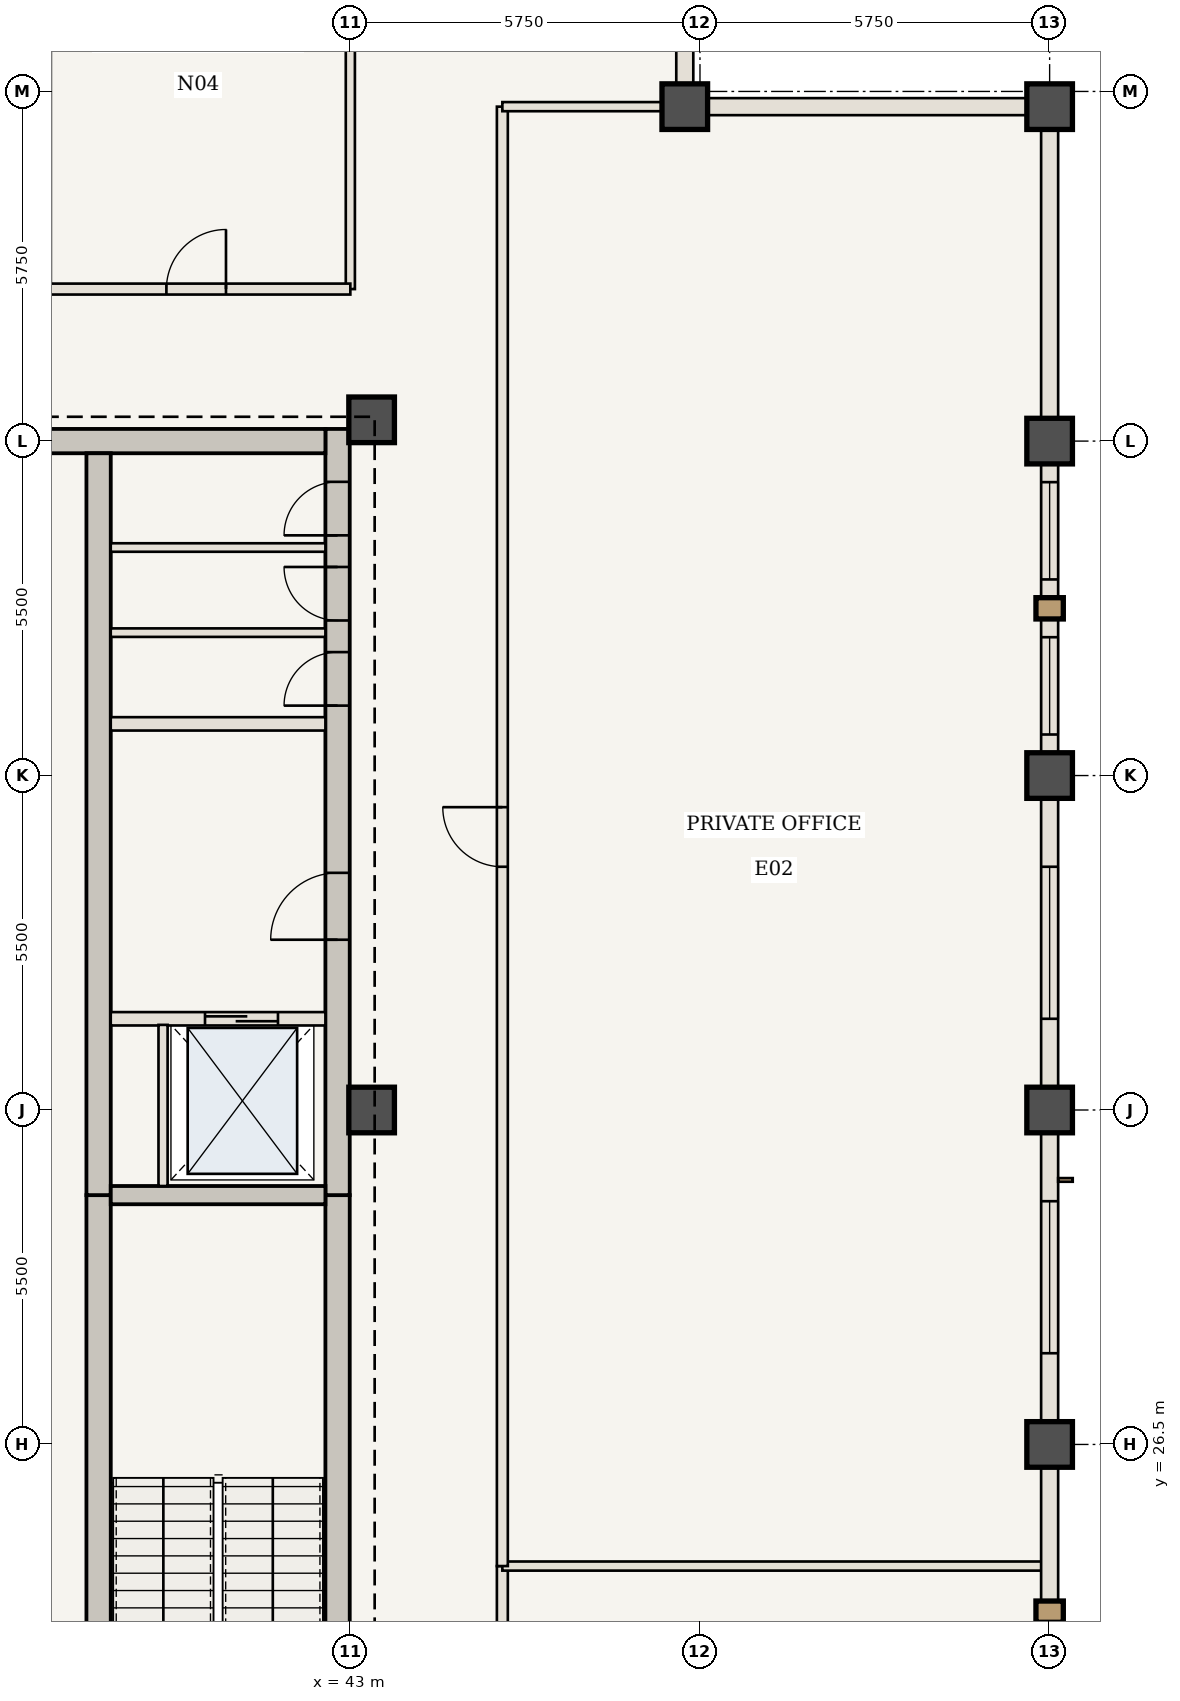
"""IFC4 building model, lengths in metres.
Left out: names, types, materials, properties, quantities, classifications, styles, units other than length and angle.
Written with IfcOpenShell. Run it as: python <this file> out.ifc"""

import sys

from ifc_helpers import new_model, si_unit, direction, frame, frame_2d, origin, origin_2d, place, context, subcontext, project, spatial, rectangle, extrude, element, fill, save


model = new_model("IFC4")
c1 = context("Model", 3, precision=1e-05, world=origin(), true_north=direction((0.0, 1.0)))
c2 = subcontext(c1, "Body", "Model", "MODEL_VIEW")
j1 = project(units=[si_unit("LENGTHUNIT", "METRE"), si_unit("PLANEANGLEUNIT", "RADIAN")], contexts=[c1])
p1 = place(None, origin())
s1 = spatial("IfcSite", under=j1, at=p1, CompositionType="ELEMENT")
p2 = place(p1, origin())
s2 = spatial("IfcBuilding", under=s1, at=p2, CompositionType="ELEMENT")
p3 = place(p2, frame((0.0, 0.0, 277.55)))
s3 = spatial("IfcBuildingStorey", under=s2, at=p3, CompositionType="ELEMENT", Elevation=277.55)
p4 = place(p3, frame((42.79, 20.75, 0.0), z_axis=(0.0, 0.0, 1.0), x_axis=(0.0, 1.0, 0.0)))
e1 = element("IfcWall", 1, at=p4, inside=s3, PredefinedType="SHEAR", context=c2, shape_type="SweptSolid", body=[
    extrude(rectangle(XDim=9.85, YDim=0.4, at=frame_2d((4.925, 0.0))), origin(), (0.0, 0.0, 1.0), 3.85),
])
p5 = place(p4, frame((1.0, 0.0, 0.0)))
e2 = element("IfcOpeningElement", 2, at=p5, cuts=e1, PredefinedType="OPENING", context=c2, shape_type="SweptSolid", body=[
    extrude(rectangle(XDim=1.15, YDim=2.15, at=frame_2d((0.575, 1.075))), frame((0.0, 0.21, 0.0), z_axis=(0.0, -1.0, 0.0), x_axis=(1.0, 0.0, 0.0)), (0.0, 0.0, 1.0), 0.42),
])
p6 = place(p3, frame((42.79, 30.6, 0.0), z_axis=(0.0, 0.0, 1.0), x_axis=(0.0, 1.0, 0.0)))
e3 = element("IfcWall", 3, at=p6, inside=s3, PredefinedType="SHEAR", context=c2, shape_type="SweptSolid", body=[
    extrude(rectangle(XDim=12.6, YDim=0.4, at=frame_2d((6.3, 0.0))), origin(), (0.0, 0.0, 1.0), 3.85),
])
p7 = place(p6, frame((4.2, 0.0, 0.0)))
e4 = element("IfcOpeningElement", 4, at=p7, cuts=e3, PredefinedType="OPENING", context=c2, shape_type="SweptSolid", body=[
    extrude(rectangle(XDim=1.1, YDim=2.15, at=frame_2d((0.55, 1.075))), frame((0.0, 0.21, 0.0), z_axis=(0.0, -1.0, 0.0), x_axis=(1.0, 0.0, 0.0)), (0.0, 0.0, 1.0), 0.42),
])
p8 = place(p6, frame((8.05, 0.0, 0.0)))
e5 = element("IfcOpeningElement", 5, at=p8, cuts=e3, PredefinedType="OPENING", context=c2, shape_type="SweptSolid", body=[
    extrude(rectangle(XDim=0.88, YDim=2.1, at=frame_2d((0.44, 1.05))), frame((0.0, 0.21, 0.0), z_axis=(0.0, -1.0, 0.0), x_axis=(1.0, 0.0, 0.0)), (0.0, 0.0, 1.0), 0.42),
])
p9 = place(p6, frame((9.45, 0.0, 0.0)))
e6 = element("IfcOpeningElement", 6, at=p9, cuts=e3, PredefinedType="OPENING", context=c2, shape_type="SweptSolid", body=[
    extrude(rectangle(XDim=0.88, YDim=2.1, at=frame_2d((0.44, 1.05))), frame((0.0, 0.21, 0.0), z_axis=(0.0, -1.0, 0.0), x_axis=(1.0, 0.0, 0.0)), (0.0, 0.0, 1.0), 0.42),
])
p10 = place(p6, frame((10.85, 0.0, 0.0)))
e7 = element("IfcOpeningElement", 7, at=p10, cuts=e3, PredefinedType="OPENING", context=c2, shape_type="SweptSolid", body=[
    extrude(rectangle(XDim=0.88, YDim=2.1, at=frame_2d((0.44, 1.05))), frame((0.0, 0.21, 0.0), z_axis=(0.0, -1.0, 0.0), x_axis=(1.0, 0.0, 0.0)), (0.0, 0.0, 1.0), 0.42),
])
p11 = place(p3, frame((37.75, 43.0, 0.0), z_axis=(0.0, 0.0, 1.0), x_axis=(1.0, 0.0, 0.0)))
e8 = element("IfcWall", 8, at=p11, inside=s3, PredefinedType="SHEAR", context=c2, shape_type="SweptSolid", body=[
    extrude(rectangle(XDim=4.84, YDim=0.4, at=frame_2d((2.42, 0.0))), origin(), (0.0, 0.0, 1.0), 3.85),
])
p12 = place(p3, frame((38.86, 21.15, 0.0), z_axis=(0.0, 0.0, 1.0), x_axis=(0.0, 1.0, 0.0)))
e9 = element("IfcWall", 9, at=p12, inside=s3, PredefinedType="SHEAR", context=c2, shape_type="SweptSolid", body=[
    extrude(rectangle(XDim=9.45, YDim=0.4, at=frame_2d((4.725, 0.0))), origin(), (0.0, 0.0, 1.0), 3.85),
])
p13 = place(p3, frame((38.86, 30.6, 0.0), z_axis=(0.0, 0.0, 1.0), x_axis=(0.0, 1.0, 0.0)))
e10 = element("IfcWall", 10, at=p13, inside=s3, PredefinedType="SHEAR", context=c2, shape_type="SweptSolid", body=[
    extrude(rectangle(XDim=12.2, YDim=0.4, at=frame_2d((6.1, 0.0))), origin(), (0.0, 0.0, 1.0), 3.85),
])
for number, where, z_axis, x_axis in (
    (11, (43.35, 32.0, 0.0), (0.0, 0.0, 1.0), (1.0, 0.0, 0.0)),
    (12, (43.35, 43.35, 0.0), (0.0, 0.0, 1.0), (1.0, 0.0, 0.0)),
    (13, (54.5, 48.5, 0.0), (0.0, 0.0, 1.0), (1.0, 0.0, 0.0)),
    (14, (48.5, 48.5, 0.0), (0.0, 0.0, 1.0), (1.0, 0.0, 0.0)),
    (15, (54.5, 26.5, 0.0), (0.0, 0.0, 1.0), (1.0, 0.0, 0.0)),
    (16, (54.5, 32.0, 0.0), (0.0, 0.0, 1.0), (1.0, 0.0, 0.0)),
    (17, (54.5, 37.5, 0.0), (0.0, 0.0, 1.0), (1.0, 0.0, 0.0)),
    (18, (54.5, 43.0, 0.0), (0.0, 0.0, 1.0), (1.0, 0.0, 0.0)),
):
    element("IfcColumn", number, at=place(p3, frame(where, z_axis=z_axis, x_axis=x_axis)), inside=s3, PredefinedType="COLUMN", context=c2, shape_type="SweptSolid", body=[
        extrude(rectangle(XDim=0.75, YDim=0.75, at=origin_2d()), origin(), (0.0, 0.0, 1.0), 3.85),
    ])
p14 = place(p3, frame((39.06, 30.6, 0.0), z_axis=(0.0, 0.0, 1.0), x_axis=(1.0, 0.0, 0.0)))
e19 = element("IfcWall", 19, at=p14, inside=s3, PredefinedType="SHEAR", context=c2, shape_type="SweptSolid", body=[
    extrude(rectangle(XDim=3.53, YDim=0.3, at=frame_2d((1.765, 0.0))), origin(), (0.0, 0.0, 1.0), 3.685),
])
p15 = place(p3, frame((39.06, 33.5, 0.0), z_axis=(0.0, 0.0, 1.0), x_axis=(1.0, 0.0, 0.0)))
e20 = element("IfcWall", 20, at=p15, inside=s3, PredefinedType="STANDARD", context=c2, shape_type="SweptSolid", body=[
    extrude(rectangle(XDim=3.53, YDim=0.22, at=frame_2d((1.765, 0.0))), origin(), (0.0, 0.0, 1.0), 3.685),
])
p16 = place(p15, frame((1.55, 0.0, 0.0)))
e21 = element("IfcOpeningElement", 21, at=p16, cuts=e20, PredefinedType="OPENING", context=c2, shape_type="SweptSolid", body=[
    extrude(rectangle(XDim=1.2, YDim=2.2, at=frame_2d((0.6, 1.1))), frame((0.0, 0.12, 0.0), z_axis=(0.0, -1.0, 0.0), x_axis=(1.0, 0.0, 0.0)), (0.0, 0.0, 1.0), 0.24),
])
p17 = place(p3, frame((39.92, 30.75, 0.0), z_axis=(0.0, 0.0, 1.0), x_axis=(0.0, 1.0, 0.0)))
e22 = element("IfcWall", 22, at=p17, inside=s3, PredefinedType="STANDARD", context=c2, shape_type="SweptSolid", body=[
    extrude(rectangle(XDim=2.65, YDim=0.15, at=frame_2d((1.325, 0.0))), origin(), (0.0, 0.0, 1.0), 3.685),
])
p18 = place(p3, frame((39.06, 38.35, 0.0), z_axis=(0.0, 0.0, 1.0), x_axis=(1.0, 0.0, 0.0)))
e23 = element("IfcWall", 23, at=p18, inside=s3, PredefinedType="STANDARD", context=c2, shape_type="SweptSolid", body=[
    extrude(rectangle(XDim=3.53, YDim=0.22, at=frame_2d((1.765, 0.0))), origin(), (0.0, 0.0, 1.0), 3.685),
])
for number, where, z_axis, x_axis in (
    (24, (39.06, 39.85, 0.0), (0.0, 0.0, 1.0), (1.0, 0.0, 0.0)),
    (25, (39.06, 41.25, 0.0), (0.0, 0.0, 1.0), (1.0, 0.0, 0.0)),
):
    element("IfcWall", number, at=place(p3, frame(where, z_axis=z_axis, x_axis=x_axis)), inside=s3, PredefinedType="STANDARD", context=c2, shape_type="SweptSolid", body=[
        extrude(rectangle(XDim=3.53, YDim=0.14, at=frame_2d((1.765, 0.0))), origin(), (0.0, 0.0, 1.0), 3.685),
    ])
p19 = place(p3, frame((43.0, 45.5, 0.0), z_axis=(0.0, 0.0, 1.0), x_axis=(0.0, 1.0, 0.0)))
e26 = element("IfcWall", 26, at=p19, inside=s3, PredefinedType="STANDARD", context=c2, shape_type="SweptSolid", body=[
    extrude(rectangle(XDim=8.94, YDim=0.15, at=frame_2d((4.47, 0.0))), origin(), (0.0, 0.0, 1.0), 3.685),
])
p20 = place(p3, frame((38.0, 45.5, 0.0), z_axis=(0.0, 0.0, 1.0), x_axis=(1.0, 0.0, 0.0)))
e27 = element("IfcWall", 27, at=p20, inside=s3, PredefinedType="STANDARD", context=c2, shape_type="SweptSolid", body=[
    extrude(rectangle(XDim=5.0, YDim=0.18, at=frame_2d((2.5, 0.0))), origin(), (0.0, 0.0, 1.0), 3.685),
])
p21 = place(p20, frame((1.975, 0.0, 0.0)))
e28 = element("IfcOpeningElement", 28, at=p21, cuts=e27, PredefinedType="OPENING", context=c2, shape_type="SweptSolid", body=[
    extrude(rectangle(XDim=0.98, YDim=2.2, at=frame_2d((0.49, 1.1))), frame((0.0, 0.1, 0.0), z_axis=(0.0, -1.0, 0.0), x_axis=(1.0, 0.0, 0.0)), (0.0, 0.0, 1.0), 0.2),
])
p22 = place(p3, frame((45.5, 15.5, 0.0), z_axis=(0.0, 0.0, 1.0), x_axis=(0.0, 1.0, 0.0)))
e29 = element("IfcWall", 29, at=p22, inside=s3, PredefinedType="STANDARD", context=c2, shape_type="SweptSolid", body=[
    extrude(rectangle(XDim=9.0, YDim=0.18, at=frame_2d((4.5, 0.0))), origin(), (0.0, 0.0, 1.0), 3.685),
])
p23 = place(p22, frame((5.45, 0.0, 0.0)))
e30 = element("IfcOpeningElement", 30, at=p23, cuts=e29, PredefinedType="OPENING", context=c2, shape_type="SweptSolid", body=[
    extrude(rectangle(XDim=0.98, YDim=2.2, at=frame_2d((0.49, 1.1))), frame((0.0, 0.1, 0.0), z_axis=(0.0, -1.0, 0.0), x_axis=(1.0, 0.0, 0.0)), (0.0, 0.0, 1.0), 0.2),
])
p24 = place(p3, frame((45.5, 24.5, 0.0), z_axis=(0.0, 0.0, 1.0), x_axis=(1.0, 0.0, 0.0)))
e31 = element("IfcWall", 31, at=p24, inside=s3, PredefinedType="STANDARD", context=c2, shape_type="SweptSolid", body=[
    extrude(rectangle(XDim=8.94, YDim=0.15, at=frame_2d((4.47, 0.0))), origin(), (0.0, 0.0, 1.0), 3.685),
])
p25 = place(p3, frame((45.5, 24.5, 0.0), z_axis=(0.0, 0.0, 1.0), x_axis=(0.0, 1.0, 0.0)))
e32 = element("IfcWall", 32, at=p25, inside=s3, PredefinedType="STANDARD", context=c2, shape_type="SweptSolid", body=[
    extrude(rectangle(XDim=24.0, YDim=0.18, at=frame_2d((12.0, 0.0))), origin(), (0.0, 0.0, 1.0), 3.685),
])
p26 = place(p25, frame((11.5, 0.0, 0.0)))
e33 = element("IfcOpeningElement", 33, at=p26, cuts=e32, PredefinedType="OPENING", context=c2, shape_type="SweptSolid", body=[
    extrude(rectangle(XDim=0.98, YDim=2.2, at=frame_2d((0.49, 1.1))), frame((0.0, 0.1, 0.0), z_axis=(0.0, -1.0, 0.0), x_axis=(1.0, 0.0, 0.0)), (0.0, 0.0, 1.0), 0.2),
])
p27 = place(p3, frame((45.5, 48.5, 0.0), z_axis=(0.0, 0.0, 1.0), x_axis=(1.0, 0.0, 0.0)))
e34 = element("IfcWall", 34, at=p27, inside=s3, PredefinedType="STANDARD", context=c2, shape_type="SweptSolid", body=[
    extrude(rectangle(XDim=3.0, YDim=0.15, at=frame_2d((1.5, 0.0))), origin(), (0.0, 0.0, 1.0), 3.685),
])
p28 = place(p3, frame((54.5, 26.5, 0.0), z_axis=(0.0, 0.0, 1.0), x_axis=(0.0, -1.0, 0.0)))
e35 = element("IfcWall", 35, at=p28, inside=s3, PredefinedType="USERDEFINED", context=c2, shape_type="SweptSolid", body=[
    extrude(rectangle(XDim=5.5, YDim=0.28, at=frame_2d((2.75, 0.0))), origin(), (0.0, 0.0, 1.0), 2.985),
])
p29 = place(p28, frame((3.225, 0.0, 0.85)))
e36 = element("IfcOpeningElement", 36, at=p29, cuts=e35, PredefinedType="OPENING", context=c2, shape_type="SweptSolid", body=[
    extrude(rectangle(XDim=1.6, YDim=1.935, at=frame_2d((0.8, 0.968))), frame((0.0, 0.15, 0.0), z_axis=(0.0, -1.0, 0.0), x_axis=(1.0, 0.0, 0.0)), (0.0, 0.0, 1.0), 0.3),
])
p30 = place(p3, frame((54.5, 32.0, 0.0), z_axis=(0.0, 0.0, 1.0), x_axis=(0.0, -1.0, 0.0)))
e37 = element("IfcWall", 37, at=p30, inside=s3, PredefinedType="USERDEFINED", context=c2, shape_type="SweptSolid", body=[
    extrude(rectangle(XDim=5.5, YDim=0.28, at=frame_2d((2.75, 0.0))), origin(), (0.0, 0.0, 1.0), 2.985),
])
p31 = place(p30, frame((1.5, 0.0, 0.85)))
e38 = element("IfcOpeningElement", 38, at=p31, cuts=e37, PredefinedType="OPENING", context=c2, shape_type="SweptSolid", body=[
    extrude(rectangle(XDim=2.5, YDim=1.935, at=frame_2d((1.25, 0.968))), frame((0.0, 0.15, 0.0), z_axis=(0.0, -1.0, 0.0), x_axis=(1.0, 0.0, 0.0)), (0.0, 0.0, 1.0), 0.3),
])
p32 = place(p3, frame((54.5, 37.5, 0.0), z_axis=(0.0, 0.0, 1.0), x_axis=(0.0, -1.0, 0.0)))
e39 = element("IfcWall", 39, at=p32, inside=s3, PredefinedType="USERDEFINED", context=c2, shape_type="SweptSolid", body=[
    extrude(rectangle(XDim=5.5, YDim=0.28, at=frame_2d((2.75, 0.0))), origin(), (0.0, 0.0, 1.0), 2.985),
])
p33 = place(p32, frame((1.5, 0.0, 0.85)))
e40 = element("IfcOpeningElement", 40, at=p33, cuts=e39, PredefinedType="OPENING", context=c2, shape_type="SweptSolid", body=[
    extrude(rectangle(XDim=2.5, YDim=1.935, at=frame_2d((1.25, 0.968))), frame((0.0, 0.15, 0.0), z_axis=(0.0, -1.0, 0.0), x_axis=(1.0, 0.0, 0.0)), (0.0, 0.0, 1.0), 0.3),
])
p34 = place(p3, frame((54.5, 43.0, 0.0), z_axis=(0.0, 0.0, 1.0), x_axis=(0.0, -1.0, 0.0)))
e41 = element("IfcWall", 41, at=p34, inside=s3, PredefinedType="USERDEFINED", context=c2, shape_type="SweptSolid", body=[
    extrude(rectangle(XDim=5.5, YDim=0.28, at=frame_2d((2.75, 0.0))), origin(), (0.0, 0.0, 1.0), 2.985),
])
p35 = place(p34, frame((0.675, 0.0, 0.85)))
e42 = element("IfcOpeningElement", 42, at=p35, cuts=e41, PredefinedType="OPENING", context=c2, shape_type="SweptSolid", body=[
    extrude(rectangle(XDim=1.6, YDim=1.935, at=frame_2d((0.8, 0.968))), frame((0.0, 0.15, 0.0), z_axis=(0.0, -1.0, 0.0), x_axis=(1.0, 0.0, 0.0)), (0.0, 0.0, 1.0), 0.3),
])
p36 = place(p34, frame((3.225, 0.0, 0.85)))
e43 = element("IfcOpeningElement", 43, at=p36, cuts=e41, PredefinedType="OPENING", context=c2, shape_type="SweptSolid", body=[
    extrude(rectangle(XDim=1.6, YDim=1.935, at=frame_2d((0.8, 0.968))), frame((0.0, 0.15, 0.0), z_axis=(0.0, -1.0, 0.0), x_axis=(1.0, 0.0, 0.0)), (0.0, 0.0, 1.0), 0.3),
])
p37 = place(p3, frame((54.5, 48.5, 0.0), z_axis=(0.0, 0.0, 1.0), x_axis=(0.0, -1.0, 0.0)))
e44 = element("IfcWall", 44, at=p37, inside=s3, PredefinedType="USERDEFINED", context=c2, shape_type="SweptSolid", body=[
    extrude(rectangle(XDim=5.5, YDim=0.28, at=frame_2d((2.75, 0.0))), origin(), (0.0, 0.0, 1.0), 2.985),
])
for number, where, z_axis, x_axis in (
    (45, (48.5, 48.5, 0.0), (0.0, 0.0, 1.0), (1.0, 0.0, 0.0)),
    (46, (48.5, 54.5, 0.0), (0.0, 0.0, 1.0), (0.0, -1.0, 0.0)),
):
    element("IfcWall", number, at=place(p3, frame(where, z_axis=z_axis, x_axis=x_axis)), inside=s3, PredefinedType="USERDEFINED", context=c2, shape_type="SweptSolid", body=[
        extrude(rectangle(XDim=6.0, YDim=0.28, at=frame_2d((3.0, 0.0))), origin(), (0.0, 0.0, 1.0), 2.985),
    ])
p38 = place(p7, origin())
e47 = element("IfcDoor", 47, at=p38, inside=s3, OperationType="SINGLE_SWING_LEFT", PredefinedType="DOOR", context=c2, shape_type="SweptSolid", body=[
    extrude(rectangle(XDim=1.1, YDim=2.15, at=frame_2d((0.55, 1.075))), frame((0.0, 0.025, 0.0), z_axis=(0.0, -1.0, 0.0), x_axis=(1.0, 0.0, 0.0)), (0.0, 0.0, 1.0), 0.05),
])
fill(e4, e47)
p39 = place(p8, origin())
e48 = element("IfcDoor", 48, at=p39, inside=s3, OperationType="SINGLE_SWING_LEFT", PredefinedType="DOOR", context=c2, shape_type="SweptSolid", body=[
    extrude(rectangle(XDim=0.88, YDim=2.1, at=frame_2d((0.44, 1.05))), frame((0.0, 0.025, 0.0), z_axis=(0.0, -1.0, 0.0), x_axis=(1.0, 0.0, 0.0)), (0.0, 0.0, 1.0), 0.05),
])
fill(e5, e48)
p40 = place(p9, origin())
e49 = element("IfcDoor", 49, at=p40, inside=s3, OperationType="SINGLE_SWING_RIGHT", PredefinedType="DOOR", context=c2, shape_type="SweptSolid", body=[
    extrude(rectangle(XDim=0.88, YDim=2.1, at=frame_2d((0.44, 1.05))), frame((0.0, 0.025, 0.0), z_axis=(0.0, -1.0, 0.0), x_axis=(1.0, 0.0, 0.0)), (0.0, 0.0, 1.0), 0.05),
])
fill(e6, e49)
p41 = place(p10, origin())
e50 = element("IfcDoor", 50, at=p41, inside=s3, OperationType="SINGLE_SWING_LEFT", PredefinedType="DOOR", context=c2, shape_type="SweptSolid", body=[
    extrude(rectangle(XDim=0.88, YDim=2.1, at=frame_2d((0.44, 1.05))), frame((0.0, 0.025, 0.0), z_axis=(0.0, -1.0, 0.0), x_axis=(1.0, 0.0, 0.0)), (0.0, 0.0, 1.0), 0.05),
])
fill(e7, e50)
p42 = place(p16, origin())
e51 = element("IfcDoor", 51, at=p42, inside=s3, OperationType="DOUBLE_DOOR_SLIDING", PredefinedType="DOOR", context=c2, shape_type="SweptSolid", body=[
    extrude(rectangle(XDim=1.2, YDim=2.2, at=frame_2d((0.6, 1.1))), frame((0.0, 0.025, 0.0), z_axis=(0.0, -1.0, 0.0), x_axis=(1.0, 0.0, 0.0)), (0.0, 0.0, 1.0), 0.05),
])
fill(e21, e51)
p43 = place(p21, origin())
e52 = element("IfcDoor", 52, at=p43, inside=s3, OperationType="SINGLE_SWING_RIGHT", PredefinedType="DOOR", context=c2, shape_type="SweptSolid", body=[
    extrude(rectangle(XDim=0.98, YDim=2.2, at=frame_2d((0.49, 1.1))), frame((0.0, 0.025, 0.0), z_axis=(0.0, -1.0, 0.0), x_axis=(1.0, 0.0, 0.0)), (0.0, 0.0, 1.0), 0.05),
])
fill(e28, e52)
p44 = place(p26, origin())
e53 = element("IfcDoor", 53, at=p44, inside=s3, OperationType="SINGLE_SWING_RIGHT", PredefinedType="DOOR", context=c2, shape_type="SweptSolid", body=[
    extrude(rectangle(XDim=0.98, YDim=2.2, at=frame_2d((0.49, 1.1))), frame((0.0, 0.025, 0.0), z_axis=(0.0, -1.0, 0.0), x_axis=(1.0, 0.0, 0.0)), (0.0, 0.0, 1.0), 0.05),
])
fill(e33, e53)
p45 = place(p31, origin())
e54 = element("IfcWindow", 54, at=p45, inside=s3, PartitioningType="SINGLE_PANEL", PredefinedType="WINDOW", context=c2, shape_type="SweptSolid", body=[
    extrude(rectangle(XDim=2.5, YDim=1.935, at=frame_2d((1.25, 0.968))), frame((0.0, 0.03, 0.0), z_axis=(0.0, -1.0, 0.0), x_axis=(1.0, 0.0, 0.0)), (0.0, 0.0, 1.0), 0.06),
])
fill(e38, e54)
p46 = place(p33, origin())
e55 = element("IfcWindow", 55, at=p46, inside=s3, PartitioningType="SINGLE_PANEL", PredefinedType="WINDOW", context=c2, shape_type="SweptSolid", body=[
    extrude(rectangle(XDim=2.5, YDim=1.935, at=frame_2d((1.25, 0.968))), frame((0.0, 0.03, 0.0), z_axis=(0.0, -1.0, 0.0), x_axis=(1.0, 0.0, 0.0)), (0.0, 0.0, 1.0), 0.06),
])
fill(e40, e55)
p47 = place(p35, origin())
e56 = element("IfcWindow", 56, at=p47, inside=s3, PartitioningType="SINGLE_PANEL", PredefinedType="WINDOW", context=c2, shape_type="SweptSolid", body=[
    extrude(rectangle(XDim=1.6, YDim=1.935, at=frame_2d((0.8, 0.968))), frame((0.0, 0.03, 0.0), z_axis=(0.0, -1.0, 0.0), x_axis=(1.0, 0.0, 0.0)), (0.0, 0.0, 1.0), 0.06),
])
fill(e42, e56)
p48 = place(p36, origin())
e57 = element("IfcWindow", 57, at=p48, inside=s3, PartitioningType="SINGLE_PANEL", PredefinedType="WINDOW", context=c2, shape_type="SweptSolid", body=[
    extrude(rectangle(XDim=1.6, YDim=1.935, at=frame_2d((0.8, 0.968))), frame((0.0, 0.03, 0.0), z_axis=(0.0, -1.0, 0.0), x_axis=(1.0, 0.0, 0.0)), (0.0, 0.0, 1.0), 0.06),
])
fill(e43, e57)
save(model, sys.argv[1])
